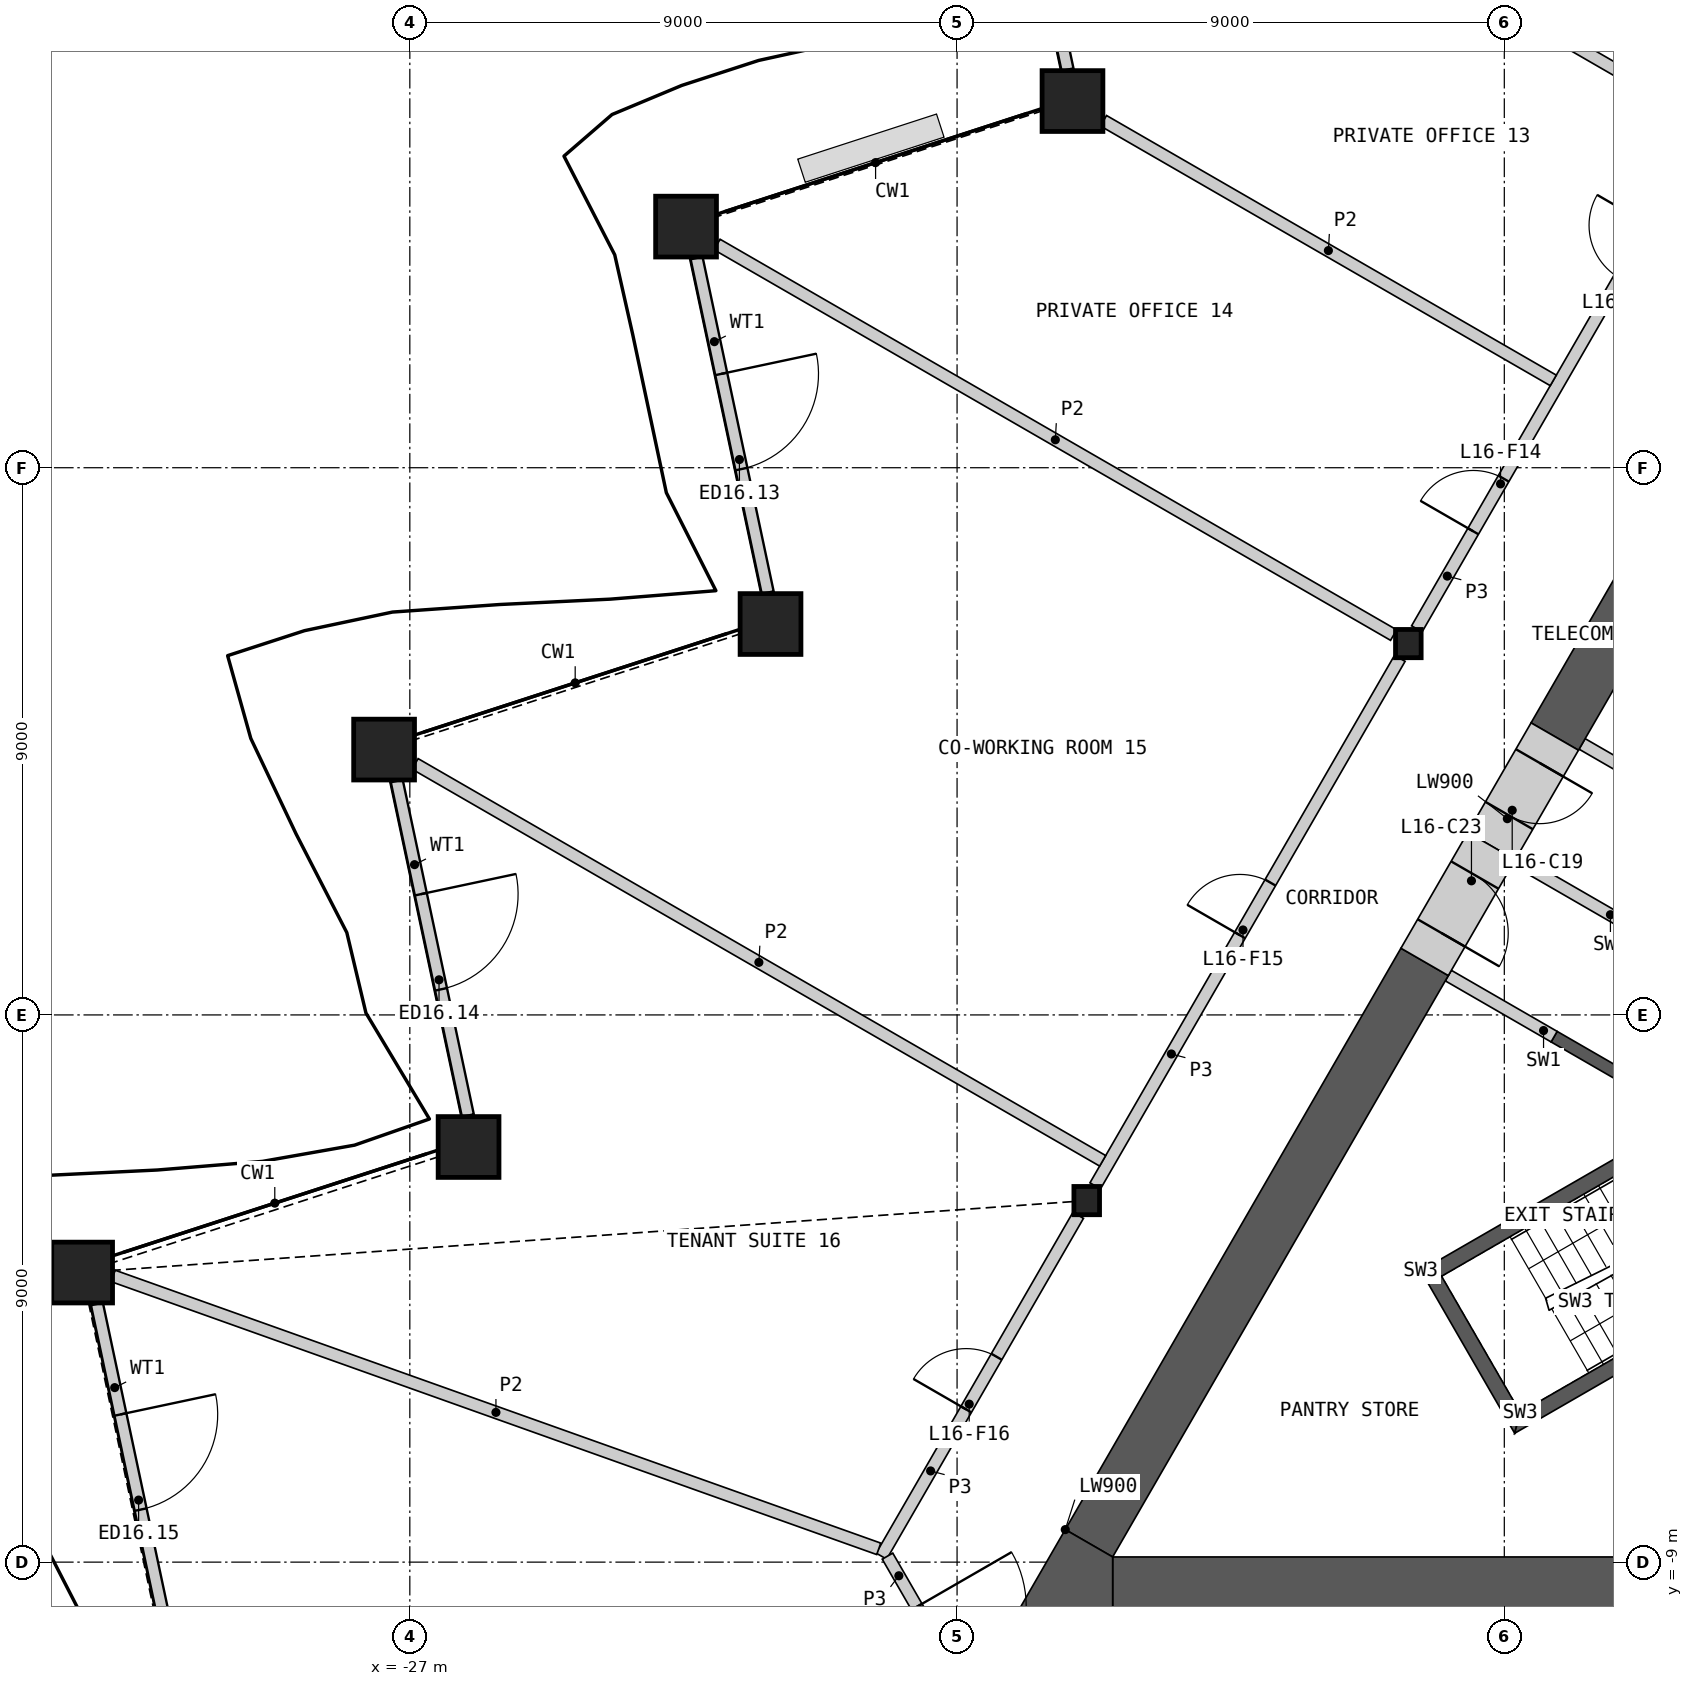
"""IFC4 building model, lengths in metres.
Left out: names, types, materials, properties, quantities, classifications, styles, units other than length and angle.
Written with IfcOpenShell. Run it as: python <this file> out.ifc"""

import sys

from ifc_helpers import new_model, si_unit, direction, frame, frame_2d, origin, origin_2d, place, context, subcontext, project, spatial, polyline, rectangle, hollow_rectangle, i_section, outline, extrude, element, fill, save


model = new_model("IFC4")
c1 = context("Model", 3, precision=1e-05, world=origin(), true_north=direction((0.0, 1.0)))
c2 = subcontext(c1, "Body", "Model", "MODEL_VIEW")
j1 = project(units=[si_unit("LENGTHUNIT", "METRE"), si_unit("PLANEANGLEUNIT", "RADIAN")], contexts=[c1])
p1 = place(None, origin())
s1 = spatial("IfcSite", under=j1, at=p1, CompositionType="ELEMENT")
p2 = place(p1, origin())
s2 = spatial("IfcBuilding", under=s1, at=p2, CompositionType="ELEMENT")
p3 = place(p2, frame((0.0, 0.0, 76.2)))
s3 = spatial("IfcBuildingStorey", under=s2, at=p3, CompositionType="ELEMENT", Elevation=76.2)
for number, where, z_axis, x_axis in (
    (1, (-16.102, 15.031, 0.0), (0.0, 0.0, 1.0), (1.0, 0.0, 0.0)),
    (2, (-22.457, 12.966, 0.0), (0.0, 0.0, 1.0), (1.0, 0.0, 0.0)),
    (3, (-21.068, 6.429, 0.0), (0.0, 0.0, 1.0), (1.0, 0.0, 0.0)),
    (4, (-27.423, 4.364, 0.0), (0.0, 0.0, 1.0), (1.0, 0.0, 0.0)),
    (5, (-26.034, -2.172, 0.0), (0.0, 0.0, 1.0), (1.0, 0.0, 0.0)),
    (6, (-32.389, -4.237, 0.0), (0.0, 0.0, 1.0), (1.0, 0.0, 0.0)),
):
    element("IfcColumn", number, at=place(p3, frame(where, z_axis=z_axis, x_axis=x_axis)), inside=s3, PredefinedType="COLUMN", context=c2, shape_type="SweptSolid", body=[
        extrude(hollow_rectangle(XDim=1.0, YDim=1.0, WallThickness=0.07, at=origin_2d()), origin(), (0.0, 0.0, 1.0), 4.2),
    ])
for number, where, z_axis, x_axis in (
    (7, (-10.578, 6.107, 0.0), (0.0, 0.0, 1.0), (1.0, 0.0, 0.0)),
    (8, (-15.868, -3.054, 0.0), (0.0, 0.0, 1.0), (1.0, 0.0, 0.0)),
):
    element("IfcColumn", number, at=place(p3, frame(where, z_axis=z_axis, x_axis=x_axis)), inside=s3, PredefinedType="COLUMN", context=c2, shape_type="SweptSolid", body=[
        extrude(i_section(OverallWidth=0.421, OverallDepth=0.465, WebThickness=0.045, FlangeThickness=0.072, at=origin_2d()), origin(), (0.0, 0.0, 1.0), 4.2),
    ])
p4 = place(p3, frame((-17.353, 21.051, 0.0), z_axis=(0.0, 0.0, 1.0), x_axis=(0.207901831982, -0.978149696242, 0.0)))
e9 = element("IfcWall", 9, at=p4, inside=s3, PredefinedType="SOLIDWALL", context=c2, shape_type="SweptSolid", body=[
    extrude(rectangle(XDim=5.626, YDim=0.2, at=frame_2d((2.813, 0.0))), origin(), (0.0, 0.0, 1.0), 3.189),
])
p5 = place(p4, frame((1.994, 0.0, 0.0)))
e10 = element("IfcOpeningElement", 10, at=p5, cuts=e9, PredefinedType="OPENING", context=c2, shape_type="SweptSolid", body=[
    extrude(rectangle(XDim=1.6, YDim=2.4, at=frame_2d((0.8, 1.2))), frame((0.0, 0.11, 0.0), z_axis=(0.0, -1.0, 0.0), x_axis=(1.0, 0.0, 0.0)), (0.0, 0.0, 1.0), 0.22),
])
p6 = place(p3, frame((-22.284, 12.449, 0.0), z_axis=(0.0, 0.0, 1.0), x_axis=(0.207943350029, -0.978140870825, 0.0)))
e11 = element("IfcWall", 11, at=p6, inside=s3, PredefinedType="SOLIDWALL", context=c2, shape_type="SweptSolid", body=[
    extrude(rectangle(XDim=5.626, YDim=0.2, at=frame_2d((2.813, 0.0))), origin(), (0.0, 0.0, 1.0), 3.189),
])
p7 = place(p6, frame((1.948, 0.0, 0.0)))
e12 = element("IfcOpeningElement", 12, at=p7, cuts=e11, PredefinedType="OPENING", context=c2, shape_type="SweptSolid", body=[
    extrude(rectangle(XDim=1.6, YDim=2.4, at=frame_2d((0.8, 1.2))), frame((0.0, 0.11, 0.0), z_axis=(0.0, -1.0, 0.0), x_axis=(1.0, 0.0, 0.0)), (0.0, 0.0, 1.0), 0.22),
])
p8 = place(p3, frame((-27.215, 3.848, 0.0), z_axis=(0.0, 0.0, 1.0), x_axis=(0.207901831982, -0.978149696242, 0.0)))
e13 = element("IfcWall", 13, at=p8, inside=s3, PredefinedType="SOLIDWALL", context=c2, shape_type="SweptSolid", body=[
    extrude(rectangle(XDim=5.626, YDim=0.2, at=frame_2d((2.813, 0.0))), origin(), (0.0, 0.0, 1.0), 3.189),
])
p9 = place(p8, frame((1.903, 0.0, 0.0)))
e14 = element("IfcOpeningElement", 14, at=p9, cuts=e13, PredefinedType="OPENING", context=c2, shape_type="SweptSolid", body=[
    extrude(rectangle(XDim=1.6, YDim=2.4, at=frame_2d((0.8, 1.2))), frame((0.0, 0.11, 0.0), z_axis=(0.0, -1.0, 0.0), x_axis=(1.0, 0.0, 0.0)), (0.0, 0.0, 1.0), 0.22),
])
p10 = place(p3, frame((-32.146, -4.754, 0.0), z_axis=(0.0, 0.0, 1.0), x_axis=(0.207901831982, -0.978149696242, 0.0)))
e15 = element("IfcWall", 15, at=p10, inside=s3, PredefinedType="SOLIDWALL", context=c2, shape_type="SweptSolid", body=[
    extrude(rectangle(XDim=5.626, YDim=0.2, at=frame_2d((2.813, 0.0))), origin(), (0.0, 0.0, 1.0), 3.189),
])
p11 = place(p10, frame((1.858, 0.0, 0.0)))
e16 = element("IfcOpeningElement", 16, at=p11, cuts=e15, PredefinedType="OPENING", context=c2, shape_type="SweptSolid", body=[
    extrude(rectangle(XDim=1.6, YDim=2.4, at=frame_2d((0.8, 1.2))), frame((0.0, 0.11, 0.0), z_axis=(0.0, -1.0, 0.0), x_axis=(1.0, 0.0, 0.0)), (0.0, 0.0, 1.0), 0.22),
])
p12 = place(p3, origin())
e17 = element("IfcWall", 17, at=p12, inside=s3, PredefinedType="SHEAR", context=c2, shape_type="SweptSolid", body=[
    extrude(outline(polyline([(-6.061, -1.697), (-8.231, -0.444), (-8.131, -0.271), (-5.96, -1.524), (-6.061, -1.697)])), origin(), (0.0, 0.0, 1.0), 3.8),
])
p13 = place(p3, frame((-5.981, 3.453, 0.0), z_axis=(0.0, 0.0, 1.0), x_axis=(-0.866013584312, 0.500020471368, 0.0)))
e18 = element("IfcWall", 18, at=p13, inside=s3, PredefinedType="SHEAR", context=c2, shape_type="SweptSolid", body=[
    extrude(rectangle(XDim=2.009, YDim=0.2, at=frame_2d((1.005, 0.0))), origin(), (0.0, 0.0, 1.0), 3.8),
])
p14 = place(p3, frame((-7.081, 1.548, 0.0), z_axis=(0.0, 0.0, 1.0), x_axis=(-0.865983199114, 0.50007309351, 0.0)))
e19 = element("IfcWall", 19, at=p14, inside=s3, PredefinedType="SHEAR", context=c2, shape_type="SweptSolid", body=[
    extrude(rectangle(XDim=2.009, YDim=0.2, at=frame_2d((1.004, 0.0))), origin(), (0.0, 0.0, 1.0), 3.8),
])
p15 = place(p3, frame((-8.181, -0.357, 0.0), z_axis=(0.0, 0.0, 1.0), x_axis=(-0.866035824272, 0.499981950752, 0.0)))
e20 = element("IfcWall", 20, at=p15, inside=s3, PredefinedType="SHEAR", context=c2, shape_type="SweptSolid", body=[
    extrude(rectangle(XDim=2.009, YDim=0.2, at=frame_2d((1.004, 0.0))), origin(), (0.0, 0.0, 1.0), 3.8),
])
p16 = place(p3, origin())
e21 = element("IfcWall", 21, at=p16, inside=s3, PredefinedType="SHEAR", context=c2, shape_type="SweptSolid", body=[
    extrude(outline(polyline([(-5.307, -1.281), (-10.374, -4.206), (-10.032, -4.298), (-5.182, -1.498), (-5.307, -1.281)])), origin(), (0.0, 0.0, 1.0), 3.8),
])
p17 = place(p3, origin())
e22 = element("IfcWall", 22, at=p17, inside=s3, PredefinedType="SHEAR", context=c2, shape_type="SweptSolid", body=[
    extrude(outline(polyline([(-10.374, -4.206), (-8.83, -6.881), (-8.738, -6.539), (-10.032, -4.298), (-10.374, -4.206)])), origin(), (0.0, 0.0, 1.0), 3.8),
])
p18 = place(p3, origin())
e23 = element("IfcWall", 23, at=p18, inside=s3, PredefinedType="SHEAR", context=c2, shape_type="SweptSolid", body=[
    extrude(outline(polyline([(-8.738, -6.539), (-8.83, -6.881), (-3.763, -3.956), (-3.888, -3.739), (-8.738, -6.539)])), origin(), (0.0, 0.0, 1.0), 3.8),
])
p19 = place(p3, frame((-15.441, -9.365, 0.0), z_axis=(0.0, 0.0, 1.0), x_axis=(1.0, 0.0, 0.0)))
e24 = element("IfcWall", 24, at=p19, inside=s3, PredefinedType="SHEAR", context=c2, shape_type="SweptSolid", body=[
    extrude(rectangle(XDim=8.871, YDim=0.9, at=frame_2d((4.435, 0.0))), origin(), (0.0, 0.0, 1.0), 3.8),
])
p20 = place(p3, frame((-10.31, 0.872, 0.0), z_axis=(0.0, 0.0, 1.0), x_axis=(-0.499991697393, -0.866030197244, 0.0)))
e25 = element("IfcWall", 25, at=p20, inside=s3, PredefinedType="SHEAR", context=c2, shape_type="SweptSolid", body=[
    extrude(rectangle(XDim=11.041, YDim=0.9, at=frame_2d((5.521, 0.0))), origin(), (0.0, 0.0, 1.0), 3.8),
])
p21 = place(p3, frame((-4.514, 10.911, 0.0), z_axis=(0.0, 0.0, 1.0), x_axis=(-0.500006662879, -0.866021556935, 0.0)))
e26 = element("IfcWall", 26, at=p21, inside=s3, PredefinedType="SHEAR", context=c2, shape_type="SweptSolid", body=[
    extrude(rectangle(XDim=7.312, YDim=0.9, at=frame_2d((3.656, 0.0))), origin(), (0.0, 0.0, 1.0), 3.8),
])
p22 = place(p3, origin())
e27 = element("IfcWall", 27, at=p22, inside=s3, PredefinedType="SHEAR", context=c2, shape_type="SweptSolid", body=[
    extrude(outline(polyline([(-16.221, -8.465), (-15.441, -8.915), (-15.441, -9.815), (-17.0, -9.815), (-16.221, -8.465)])), origin(), (0.0, 0.0, 1.0), 3.8),
])
p23 = place(p3, frame((-8.17, 4.579, 0.0), z_axis=(0.0, 0.0, 1.0), x_axis=(-0.499888406853, -0.866089822532, 0.0)))
e28 = element("IfcWall", 28, at=p23, inside=s3, PredefinedType="SHEAR", context=c2, shape_type="SweptSolid", body=[
    extrude(rectangle(XDim=2.08, YDim=0.9, at=frame_2d((1.04, 0.0))), origin(), (0.0, 0.0, 1.0), 3.8),
])
p24 = place(p23, frame((0.5, 0.0, 0.0)))
e29 = element("IfcOpeningElement", 29, at=p24, cuts=e28, PredefinedType="OPENING", context=c2, shape_type="SweptSolid", body=[
    extrude(rectangle(XDim=1.0, YDim=2.1, at=frame_2d((0.5, 1.05))), frame((0.0, 0.46, 0.0), z_axis=(0.0, -1.0, 0.0), x_axis=(1.0, 0.0, 0.0)), (0.0, 0.0, 1.0), 0.92),
])
p25 = place(p3, frame((-9.21, 2.777, 0.0), z_axis=(0.0, 0.0, 1.0), x_axis=(-0.500077893725, -0.86598042715, 0.0)))
e30 = element("IfcWall", 30, at=p25, inside=s3, PredefinedType="SHEAR", context=c2, shape_type="SweptSolid", body=[
    extrude(rectangle(XDim=2.2, YDim=0.9, at=frame_2d((1.1, 0.0))), origin(), (0.0, 0.0, 1.0), 3.8),
])
p26 = place(p25, frame((0.55, 0.0, 0.0)))
e31 = element("IfcOpeningElement", 31, at=p26, cuts=e30, PredefinedType="OPENING", context=c2, shape_type="SweptSolid", body=[
    extrude(rectangle(XDim=1.1, YDim=2.1, at=frame_2d((0.55, 1.05))), frame((0.0, 0.46, 0.0), z_axis=(0.0, -1.0, 0.0), x_axis=(1.0, 0.0, 0.0)), (0.0, 0.0, 1.0), 0.92),
])
p27 = place(p3, frame((-15.728, -2.811, 0.0), z_axis=(0.0, 0.0, 1.0), x_axis=(0.49999175339, 0.866030164915, 0.0)))
e32 = element("IfcWall", 32, at=p27, inside=s3, PredefinedType="PARTITIONING", context=c2, shape_type="SweptSolid", body=[
    extrude(rectangle(XDim=10.019, YDim=0.2, at=frame_2d((5.009, 0.0))), origin(), (0.0, 0.0, 1.0), 3.8),
])
p28 = place(p27, frame((4.76, 0.0, 0.0)))
e33 = element("IfcOpeningElement", 33, at=p28, cuts=e32, PredefinedType="OPENING", context=c2, shape_type="SweptSolid", body=[
    extrude(rectangle(XDim=1.0, YDim=2.1, at=frame_2d((0.5, 1.05))), frame((0.0, 0.11, 0.0), z_axis=(0.0, -1.0, 0.0), x_axis=(1.0, 0.0, 0.0)), (0.0, 0.0, 1.0), 0.22),
])
p29 = place(p3, frame((-10.439, 6.35, 0.0), z_axis=(0.0, 0.0, 1.0), x_axis=(0.50001002959, 0.86601961312, 0.0)))
e34 = element("IfcWall", 34, at=p29, inside=s3, PredefinedType="PARTITIONING", context=c2, shape_type="SweptSolid", body=[
    extrude(rectangle(XDim=10.019, YDim=0.2, at=frame_2d((5.009, 0.0))), origin(), (0.0, 0.0, 1.0), 3.8),
])
p30 = place(p29, frame((6.664, 0.0, 0.0)))
e35 = element("IfcOpeningElement", 35, at=p30, cuts=e34, PredefinedType="OPENING", context=c2, shape_type="SweptSolid", body=[
    extrude(rectangle(XDim=1.0, YDim=2.1, at=frame_2d((0.5, 1.05))), frame((0.0, 0.11, 0.0), z_axis=(0.0, -1.0, 0.0), x_axis=(1.0, 0.0, 0.0)), (0.0, 0.0, 1.0), 0.22),
])
p31 = place(p29, frame((1.854, 0.0, 0.0)))
e36 = element("IfcOpeningElement", 36, at=p31, cuts=e34, PredefinedType="OPENING", context=c2, shape_type="SweptSolid", body=[
    extrude(rectangle(XDim=1.0, YDim=2.1, at=frame_2d((0.5, 1.05))), frame((0.0, 0.11, 0.0), z_axis=(0.0, -1.0, 0.0), x_axis=(1.0, 0.0, 0.0)), (0.0, 0.0, 1.0), 0.22),
])
p32 = place(p3, frame((-19.244, -8.902, 0.0), z_axis=(0.0, 0.0, 1.0), x_axis=(0.499984737558, 0.86603421538, 0.0)))
e37 = element("IfcWall", 37, at=p32, inside=s3, PredefinedType="PARTITIONING", context=c2, shape_type="SweptSolid", body=[
    extrude(rectangle(XDim=6.473, YDim=0.2, at=frame_2d((3.236, 0.0))), origin(), (0.0, 0.0, 1.0), 3.8),
])
p33 = place(p32, frame((2.787, 0.0, 0.0)))
e38 = element("IfcOpeningElement", 38, at=p33, cuts=e37, PredefinedType="OPENING", context=c2, shape_type="SweptSolid", body=[
    extrude(rectangle(XDim=1.0, YDim=2.1, at=frame_2d((0.5, 1.05))), frame((0.0, 0.11, 0.0), z_axis=(0.0, -1.0, 0.0), x_axis=(1.0, 0.0, 0.0)), (0.0, 0.0, 1.0), 0.22),
])
p34 = place(p3, frame((-19.144, -8.902, 0.0), z_axis=(0.0, 0.0, 1.0), x_axis=(0.499958791762, -0.866049194065, 0.0)))
e39 = element("IfcWall", 39, at=p34, inside=s3, PredefinedType="PARTITIONING", context=c2, shape_type="SweptSolid", body=[
    extrude(rectangle(XDim=3.726, YDim=0.2, at=frame_2d((1.863, 0.0))), origin(), (0.0, 0.0, 1.0), 3.8),
])
p35 = place(p34, frame((0.963, 0.0, 0.0)))
e40 = element("IfcOpeningElement", 40, at=p35, cuts=e39, PredefinedType="OPENING", context=c2, shape_type="SweptSolid", body=[
    extrude(rectangle(XDim=1.8, YDim=2.1, at=frame_2d((0.9, 1.05))), frame((0.0, 0.11, 0.0), z_axis=(0.0, -1.0, 0.0), x_axis=(1.0, 0.0, 0.0)), (0.0, 0.0, 1.0), 0.22),
])
p36 = place(p3, frame((-31.879, -4.293, 0.0), z_axis=(0.0, 0.0, 1.0), x_axis=(0.94194008836, -0.33578098508, 0.0)))
e41 = element("IfcWall", 41, at=p36, inside=s3, PredefinedType="PARTITIONING", context=c2, shape_type="SweptSolid", body=[
    extrude(rectangle(XDim=13.367, YDim=0.2, at=frame_2d((6.684, 0.0))), origin(), (0.0, 0.0, 1.0), 2.885),
])
p37 = place(p3, frame((-26.913, 4.129, 0.0), z_axis=(0.0, 0.0, 1.0), x_axis=(0.866026475891, -0.499998143053, 0.0)))
e42 = element("IfcWall", 42, at=p37, inside=s3, PredefinedType="PARTITIONING", context=c2, shape_type="SweptSolid", body=[
    extrude(rectangle(XDim=13.057, YDim=0.2, at=frame_2d((6.529, 0.0))), origin(), (0.0, 0.0, 1.0), 2.885),
])
p38 = place(p3, frame((-16.981, 21.213, 0.0), z_axis=(0.0, 0.0, 1.0), x_axis=(0.866032633092, -0.499987478263, 0.0)))
e43 = element("IfcWall", 43, at=p38, inside=s3, PredefinedType="PARTITIONING", context=c2, shape_type="SweptSolid", body=[
    extrude(rectangle(XDim=12.998, YDim=0.2, at=frame_2d((6.499, 0.0))), origin(), (0.0, 0.0, 1.0), 2.885),
])
p39 = place(p3, frame((-21.947, 12.671, 0.0), z_axis=(0.0, 0.0, 1.0), x_axis=(0.866026729935, -0.499997703033, 0.0)))
e44 = element("IfcWall", 44, at=p39, inside=s3, PredefinedType="PARTITIONING", context=c2, shape_type="SweptSolid", body=[
    extrude(rectangle(XDim=12.848, YDim=0.2, at=frame_2d((6.424, 0.0))), origin(), (0.0, 0.0, 1.0), 2.885),
])
p40 = place(p3, frame((-15.592, 14.707, 0.0), z_axis=(0.0, 0.0, 1.0), x_axis=(0.866032315796, -0.499988027854, 0.0)))
e45 = element("IfcWall", 45, at=p40, inside=s3, PredefinedType="PARTITIONING", context=c2, shape_type="SweptSolid", body=[
    extrude(rectangle(XDim=8.541, YDim=0.2, at=frame_2d((4.271, 0.0))), origin(), (0.0, 0.0, 1.0), 2.885),
])
p41 = place(p7, origin())
e46 = element("IfcDoor", 46, at=p41, inside=s3, OperationType="DOUBLE_DOOR_SINGLE_SWING", PredefinedType="DOOR", context=c2, shape_type="SweptSolid", body=[
    extrude(rectangle(XDim=1.6, YDim=2.4, at=frame_2d((0.8, 1.2))), frame((0.0, 0.025, 0.0), z_axis=(0.0, -1.0, 0.0), x_axis=(1.0, 0.0, 0.0)), (0.0, 0.0, 1.0), 0.05),
])
fill(e12, e46)
p42 = place(p9, origin())
e47 = element("IfcDoor", 47, at=p42, inside=s3, OperationType="DOUBLE_DOOR_SINGLE_SWING", PredefinedType="DOOR", context=c2, shape_type="SweptSolid", body=[
    extrude(rectangle(XDim=1.6, YDim=2.4, at=frame_2d((0.8, 1.2))), frame((0.0, 0.025, 0.0), z_axis=(0.0, -1.0, 0.0), x_axis=(1.0, 0.0, 0.0)), (0.0, 0.0, 1.0), 0.05),
])
fill(e14, e47)
p43 = place(p11, origin())
e48 = element("IfcDoor", 48, at=p43, inside=s3, OperationType="DOUBLE_DOOR_SINGLE_SWING", PredefinedType="DOOR", context=c2, shape_type="SweptSolid", body=[
    extrude(rectangle(XDim=1.6, YDim=2.4, at=frame_2d((0.8, 1.2))), frame((0.0, 0.025, 0.0), z_axis=(0.0, -1.0, 0.0), x_axis=(1.0, 0.0, 0.0)), (0.0, 0.0, 1.0), 0.05),
])
fill(e16, e48)
p44 = place(p24, origin())
e49 = element("IfcDoor", 49, at=p44, inside=s3, OperationType="SINGLE_SWING_LEFT", PredefinedType="DOOR", context=c2, shape_type="SweptSolid", body=[
    extrude(rectangle(XDim=1.0, YDim=2.1, at=frame_2d((0.5, 1.05))), frame((0.0, 0.205, 0.0), z_axis=(0.0, -1.0, 0.0), x_axis=(1.0, 0.0, 0.0)), (0.0, 0.0, 1.0), 0.05),
])
fill(e29, e49)
p45 = place(p26, origin())
e50 = element("IfcDoor", 50, at=p45, inside=s3, OperationType="SINGLE_SWING_RIGHT", PredefinedType="DOOR", context=c2, shape_type="SweptSolid", body=[
    extrude(rectangle(XDim=1.1, YDim=2.1, at=frame_2d((0.55, 1.05))), frame((0.0, 0.205, 0.0), z_axis=(0.0, -1.0, 0.0), x_axis=(1.0, 0.0, 0.0)), (0.0, 0.0, 1.0), 0.05),
])
fill(e31, e50)
p46 = place(p31, origin())
e51 = element("IfcDoor", 51, at=p46, inside=s3, OperationType="SINGLE_SWING_LEFT", PredefinedType="DOOR", context=c2, shape_type="SweptSolid", body=[
    extrude(rectangle(XDim=1.0, YDim=2.1, at=frame_2d((0.5, 1.05))), frame((0.0, 0.025, 0.0), z_axis=(0.0, -1.0, 0.0), x_axis=(1.0, 0.0, 0.0)), (0.0, 0.0, 1.0), 0.05),
])
fill(e36, e51)
p47 = place(p28, origin())
e52 = element("IfcDoor", 52, at=p47, inside=s3, OperationType="SINGLE_SWING_LEFT", PredefinedType="DOOR", context=c2, shape_type="SweptSolid", body=[
    extrude(rectangle(XDim=1.0, YDim=2.1, at=frame_2d((0.5, 1.05))), frame((0.0, 0.025, 0.0), z_axis=(0.0, -1.0, 0.0), x_axis=(1.0, 0.0, 0.0)), (0.0, 0.0, 1.0), 0.05),
])
fill(e33, e52)
p48 = place(p33, origin())
e53 = element("IfcDoor", 53, at=p48, inside=s3, OperationType="SINGLE_SWING_LEFT", PredefinedType="DOOR", context=c2, shape_type="SweptSolid", body=[
    extrude(rectangle(XDim=1.0, YDim=2.1, at=frame_2d((0.5, 1.05))), frame((0.0, 0.025, 0.0), z_axis=(0.0, -1.0, 0.0), x_axis=(1.0, 0.0, 0.0)), (0.0, 0.0, 1.0), 0.05),
])
fill(e38, e53)
p49 = place(p35, origin())
e54 = element("IfcDoor", 54, at=p49, inside=s3, OperationType="DOUBLE_DOOR_SINGLE_SWING", PredefinedType="DOOR", context=c2, shape_type="SweptSolid", body=[
    extrude(rectangle(XDim=1.8, YDim=2.1, at=frame_2d((0.9, 1.05))), frame((0.0, 0.025, 0.0), z_axis=(0.0, -1.0, 0.0), x_axis=(1.0, 0.0, 0.0)), (0.0, 0.0, 1.0), 0.05),
])
fill(e40, e54)
save(model, sys.argv[1])
